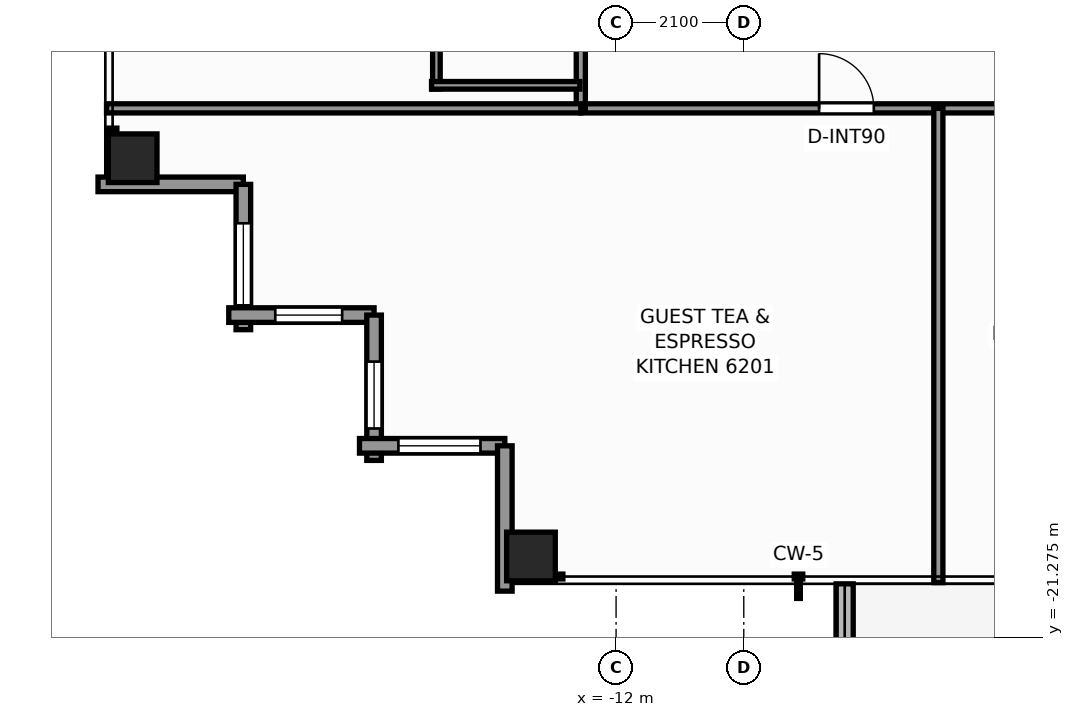
"""IFC4 building model, lengths in metres.
Left out: names, types, materials, properties, quantities, classifications, styles, units other than length and angle.
Written with IfcOpenShell. Run it as: python <this file> out.ifc"""

import sys

from ifc_helpers import new_model, si_unit, direction, frame, frame_2d, origin, origin_2d, place, context, subcontext, project, spatial, rectangle, extrude, element, fill, save


model = new_model("IFC4")
c1 = context("Model", 3, precision=1e-05, world=origin(), true_north=direction((0.0, 1.0)))
c2 = subcontext(c1, "Body", "Model", "MODEL_VIEW")
j1 = project(units=[si_unit("LENGTHUNIT", "METRE"), si_unit("PLANEANGLEUNIT", "RADIAN")], contexts=[c1])
p1 = place(None, origin())
s1 = spatial("IfcSite", under=j1, at=p1, CompositionType="ELEMENT")
p2 = place(p1, origin())
s2 = spatial("IfcBuilding", under=s1, at=p2, CompositionType="ELEMENT")
p3 = place(p2, frame((0.0, 0.0, 213.0)))
s3 = spatial("IfcBuildingStorey", under=s2, at=p3, CompositionType="ELEMENT", Elevation=213.0)
for number, where, z_axis, x_axis in (
    (1, (-13.4, -19.95, 0.0), (0.0, 0.0, 1.0), (1.0, 0.0, 0.0)),
    (2, (-19.95, -13.4, 0.0), (0.0, 0.0, 1.0), (1.0, 0.0, 0.0)),
):
    element("IfcColumn", number, at=place(p3, frame(where, z_axis=z_axis, x_axis=x_axis)), inside=s3, PredefinedType="COLUMN", context=c2, shape_type="SweptSolid", body=[
        extrude(rectangle(XDim=0.8, YDim=0.8, at=origin_2d()), origin(), (0.0, 0.0, 1.0), 3.3),
    ])
p4 = place(p3, frame((-8.24, -20.4, -0.04), z_axis=(0.0, 0.0, 1.0), x_axis=(0.0, -1.0, 0.0)))
e3 = element("IfcWall", 3, at=p4, inside=s3, PredefinedType="PARAPET", context=c2, shape_type="SweptSolid", body=[
    extrude(rectangle(XDim=1.466, YDim=0.28, at=frame_2d((0.733, 0.0))), origin(), (0.0, 0.0, 1.0), 0.42),
])
p5 = place(p3, frame((-18.13, -13.83, 0.0), z_axis=(0.0, 0.0, 1.0), x_axis=(-1.0, 0.0, 0.0)))
e4 = element("IfcWall", 4, at=p5, inside=s3, PredefinedType="STANDARD", context=c2, shape_type="SweptSolid", body=[
    extrude(rectangle(XDim=2.39, YDim=0.24, at=frame_2d((1.195, 0.0))), origin(), (0.0, 0.0, 1.0), 2.463),
])
p6 = place(p3, frame((-18.13, -16.22, 0.0), z_axis=(0.0, 0.0, 1.0), x_axis=(0.0, 1.0, 0.0)))
e5 = element("IfcWall", 5, at=p6, inside=s3, PredefinedType="STANDARD", context=c2, shape_type="SweptSolid", body=[
    extrude(rectangle(XDim=2.39, YDim=0.24, at=frame_2d((1.195, 0.0))), origin(), (0.0, 0.0, 1.0), 2.463),
])
p7 = place(p6, frame((0.4, 0.0, 0.65)))
e6 = element("IfcOpeningElement", 6, at=p7, cuts=e5, PredefinedType="OPENING", context=c2, shape_type="SweptSolid", body=[
    extrude(rectangle(XDim=1.35, YDim=1.55, at=frame_2d((0.675, 0.775))), frame((0.0, 0.13, 0.0), z_axis=(0.0, -1.0, 0.0), x_axis=(1.0, 0.0, 0.0)), (0.0, 0.0, 1.0), 0.26),
])
p8 = place(p3, frame((-15.98, -15.98, 0.0), z_axis=(0.0, 0.0, 1.0), x_axis=(-1.0, 0.0, 0.0)))
e7 = element("IfcWall", 7, at=p8, inside=s3, PredefinedType="STANDARD", context=c2, shape_type="SweptSolid", body=[
    extrude(rectangle(XDim=2.39, YDim=0.24, at=frame_2d((1.195, 0.0))), origin(), (0.0, 0.0, 1.0), 2.463),
])
p9 = place(p8, frame((0.525, 0.0, 0.65)))
e8 = element("IfcOpeningElement", 8, at=p9, cuts=e7, PredefinedType="OPENING", context=c2, shape_type="SweptSolid", body=[
    extrude(rectangle(XDim=1.1, YDim=1.45, at=frame_2d((0.55, 0.725))), frame((0.0, 0.13, 0.0), z_axis=(0.0, -1.0, 0.0), x_axis=(1.0, 0.0, 0.0)), (0.0, 0.0, 1.0), 0.26),
])
p10 = place(p3, frame((-15.98, -18.37, 0.0), z_axis=(0.0, 0.0, 1.0), x_axis=(0.0, 1.0, 0.0)))
e9 = element("IfcWall", 9, at=p10, inside=s3, PredefinedType="STANDARD", context=c2, shape_type="SweptSolid", body=[
    extrude(rectangle(XDim=2.39, YDim=0.24, at=frame_2d((1.195, 0.0))), origin(), (0.0, 0.0, 1.0), 2.463),
])
p11 = place(p10, frame((0.525, 0.0, 0.65)))
e10 = element("IfcOpeningElement", 10, at=p11, cuts=e9, PredefinedType="OPENING", context=c2, shape_type="SweptSolid", body=[
    extrude(rectangle(XDim=1.1, YDim=1.45, at=frame_2d((0.55, 0.725))), frame((0.0, 0.13, 0.0), z_axis=(0.0, -1.0, 0.0), x_axis=(1.0, 0.0, 0.0)), (0.0, 0.0, 1.0), 0.26),
])
p12 = place(p3, frame((-13.83, -18.13, 0.0), z_axis=(0.0, 0.0, 1.0), x_axis=(-1.0, 0.0, 0.0)))
e11 = element("IfcWall", 11, at=p12, inside=s3, PredefinedType="STANDARD", context=c2, shape_type="SweptSolid", body=[
    extrude(rectangle(XDim=2.39, YDim=0.24, at=frame_2d((1.195, 0.0))), origin(), (0.0, 0.0, 1.0), 2.463),
])
p13 = place(p12, frame((0.4, 0.0, 0.65)))
e12 = element("IfcOpeningElement", 12, at=p13, cuts=e11, PredefinedType="OPENING", context=c2, shape_type="SweptSolid", body=[
    extrude(rectangle(XDim=1.35, YDim=1.55, at=frame_2d((0.675, 0.775))), frame((0.0, 0.13, 0.0), z_axis=(0.0, -1.0, 0.0), x_axis=(1.0, 0.0, 0.0)), (0.0, 0.0, 1.0), 0.26),
])
p14 = place(p3, frame((-13.83, -20.52, 0.0), z_axis=(0.0, 0.0, 1.0), x_axis=(0.0, 1.0, 0.0)))
e13 = element("IfcWall", 13, at=p14, inside=s3, PredefinedType="STANDARD", context=c2, shape_type="SweptSolid", body=[
    extrude(rectangle(XDim=2.39, YDim=0.24, at=frame_2d((1.195, 0.0))), origin(), (0.0, 0.0, 1.0), 2.463),
])
p15 = place(p3, frame((-12.58, -12.58, 0.0), z_axis=(0.0, 0.0, 1.0), x_axis=(1.0, 0.0, 0.0)))
e14 = element("IfcWall", 14, at=p15, inside=s3, PredefinedType="PARTITIONING", context=c2, shape_type="SweptSolid", body=[
    extrude(rectangle(XDim=25.16, YDim=0.15, at=frame_2d((12.58, 0.0))), origin(), (0.0, 0.0, 1.0), 2.369),
])
p16 = place(p15, frame((3.919, 0.0, 0.0)))
e15 = element("IfcOpeningElement", 15, at=p16, cuts=e14, PredefinedType="OPENING", context=c2, shape_type="SweptSolid", body=[
    extrude(rectangle(XDim=0.9, YDim=2.06, at=frame_2d((0.45, 1.03))), frame((0.0, 0.085, 0.0), z_axis=(0.0, -1.0, 0.0), x_axis=(1.0, 0.0, 0.0)), (0.0, 0.0, 1.0), 0.17),
])
p17 = place(p15, frame((8.951, 0.0, 0.0)))
e16 = element("IfcOpeningElement", 16, at=p17, cuts=e14, PredefinedType="OPENING", context=c2, shape_type="SweptSolid", body=[
    extrude(rectangle(XDim=0.9, YDim=2.06, at=frame_2d((0.45, 1.03))), frame((0.0, 0.085, 0.0), z_axis=(0.0, -1.0, 0.0), x_axis=(1.0, 0.0, 0.0)), (0.0, 0.0, 1.0), 0.17),
])
p18 = place(p15, frame((10.78, 0.0, 0.0)))
e17 = element("IfcOpeningElement", 17, at=p18, cuts=e14, PredefinedType="OPENING", context=c2, shape_type="SweptSolid", body=[
    extrude(rectangle(XDim=0.9, YDim=2.06, at=frame_2d((0.45, 1.03))), frame((0.0, 0.085, 0.0), z_axis=(0.0, -1.0, 0.0), x_axis=(1.0, 0.0, 0.0)), (0.0, 0.0, 1.0), 0.17),
])
p19 = place(p15, frame((13.749, 0.0, 0.0)))
e18 = element("IfcOpeningElement", 18, at=p19, cuts=e14, PredefinedType="OPENING", context=c2, shape_type="SweptSolid", body=[
    extrude(rectangle(XDim=0.95, YDim=2.06, at=frame_2d((0.475, 1.03))), frame((0.0, 0.085, 0.0), z_axis=(0.0, -1.0, 0.0), x_axis=(1.0, 0.0, 0.0)), (0.0, 0.0, 1.0), 0.17),
])
p20 = place(p15, frame((18.268, 0.0, 0.0)))
e19 = element("IfcOpeningElement", 19, at=p20, cuts=e14, PredefinedType="OPENING", context=c2, shape_type="SweptSolid", body=[
    extrude(rectangle(XDim=0.9, YDim=2.06, at=frame_2d((0.45, 1.03))), frame((0.0, 0.085, 0.0), z_axis=(0.0, -1.0, 0.0), x_axis=(1.0, 0.0, 0.0)), (0.0, 0.0, 1.0), 0.17),
])
p21 = place(p15, frame((20.283, 0.0, 0.0)))
e20 = element("IfcOpeningElement", 20, at=p21, cuts=e14, PredefinedType="OPENING", context=c2, shape_type="SweptSolid", body=[
    extrude(rectangle(XDim=0.95, YDim=2.06, at=frame_2d((0.475, 1.03))), frame((0.0, 0.085, 0.0), z_axis=(0.0, -1.0, 0.0), x_axis=(1.0, 0.0, 0.0)), (0.0, 0.0, 1.0), 0.17),
])
p22 = place(p3, frame((-12.58, -12.58, 0.0), z_axis=(0.0, 0.0, 1.0), x_axis=(0.0, 1.0, 0.0)))
e21 = element("IfcWall", 21, at=p22, inside=s3, PredefinedType="PARTITIONING", context=c2, shape_type="SweptSolid", body=[
    extrude(rectangle(XDim=24.84, YDim=0.15, at=frame_2d((12.42, 0.0))), origin(), (0.0, 0.0, 1.0), 2.369),
])
p23 = place(p22, frame((3.856, 0.0, 0.0)))
e22 = element("IfcOpeningElement", 22, at=p23, cuts=e21, PredefinedType="OPENING", context=c2, shape_type="SweptSolid", body=[
    extrude(rectangle(XDim=0.95, YDim=2.06, at=frame_2d((0.475, 1.03))), frame((0.0, 0.085, 0.0), z_axis=(0.0, -1.0, 0.0), x_axis=(1.0, 0.0, 0.0)), (0.0, 0.0, 1.0), 0.17),
])
p24 = place(p22, frame((9.958, 0.0, 0.0)))
e23 = element("IfcOpeningElement", 23, at=p24, cuts=e21, PredefinedType="OPENING", context=c2, shape_type="SweptSolid", body=[
    extrude(rectangle(XDim=0.95, YDim=2.06, at=frame_2d((0.475, 1.03))), frame((0.0, 0.085, 0.0), z_axis=(0.0, -1.0, 0.0), x_axis=(1.0, 0.0, 0.0)), (0.0, 0.0, 1.0), 0.17),
])
p25 = place(p22, frame((19.64, 0.0, 0.0)))
e24 = element("IfcOpeningElement", 24, at=p25, cuts=e21, PredefinedType="OPENING", context=c2, shape_type="SweptSolid", body=[
    extrude(rectangle(XDim=0.95, YDim=2.06, at=frame_2d((0.475, 1.03))), frame((0.0, 0.085, 0.0), z_axis=(0.0, -1.0, 0.0), x_axis=(1.0, 0.0, 0.0)), (0.0, 0.0, 1.0), 0.17),
])
p26 = place(p3, frame((-20.38, -12.58, 0.0), z_axis=(0.0, 0.0, 1.0), x_axis=(1.0, 0.0, 0.0)))
e25 = element("IfcWall", 25, at=p26, inside=s3, PredefinedType="PARTITIONING", context=c2, shape_type="SweptSolid", body=[
    extrude(rectangle(XDim=7.8, YDim=0.15, at=frame_2d((3.9, 0.0))), origin(), (0.0, 0.0, 1.0), 2.369),
])
p27 = place(p3, frame((-6.7, -20.38, 0.0), z_axis=(0.0, 0.0, 1.0), x_axis=(0.0, 1.0, 0.0)))
e26 = element("IfcWall", 26, at=p27, inside=s3, PredefinedType="PARTITIONING", context=c2, shape_type="SweptSolid", body=[
    extrude(rectangle(XDim=7.8, YDim=0.15, at=frame_2d((3.9, 0.0))), origin(), (0.0, 0.0, 1.0), 2.453),
])
p28 = place(p3, frame((-14.955, -12.261, 0.0), z_axis=(0.0, 0.0, 1.0), x_axis=(0.0, 1.0, 0.0)))
e27 = element("IfcWall", 27, at=p28, inside=s3, PredefinedType="PARTITIONING", context=c2, shape_type="SweptSolid", body=[
    extrude(rectangle(XDim=2.27, YDim=0.125, at=frame_2d((1.135, 0.0))), origin(), (0.0, 0.0, 1.0), 2.369),
])
p29 = place(p3, frame((-15.035, -12.201, 0.0), z_axis=(0.0, 0.0, 1.0), x_axis=(1.0, 0.0, 0.0)))
e28 = element("IfcWall", 28, at=p29, inside=s3, PredefinedType="PARTITIONING", context=c2, shape_type="SweptSolid", body=[
    extrude(rectangle(XDim=2.44, YDim=0.125, at=frame_2d((1.22, 0.0))), origin(), (0.0, 0.0, 1.0), 3.08),
])
p30 = place(p7, origin())
e29 = element("IfcWindow", 29, at=p30, inside=s3, PartitioningType="SINGLE_PANEL", PredefinedType="WINDOW", context=c2, shape_type="SweptSolid", body=[
    extrude(rectangle(XDim=1.35, YDim=1.55, at=frame_2d((0.675, 0.775))), frame((0.0, 0.03, 0.0), z_axis=(0.0, -1.0, 0.0), x_axis=(1.0, 0.0, 0.0)), (0.0, 0.0, 1.0), 0.06),
])
fill(e6, e29)
p31 = place(p9, origin())
e30 = element("IfcWindow", 30, at=p31, inside=s3, PartitioningType="SINGLE_PANEL", PredefinedType="WINDOW", context=c2, shape_type="SweptSolid", body=[
    extrude(rectangle(XDim=1.1, YDim=1.45, at=frame_2d((0.55, 0.725))), frame((0.0, 0.03, 0.0), z_axis=(0.0, -1.0, 0.0), x_axis=(1.0, 0.0, 0.0)), (0.0, 0.0, 1.0), 0.06),
])
fill(e8, e30)
p32 = place(p11, origin())
e31 = element("IfcWindow", 31, at=p32, inside=s3, PartitioningType="SINGLE_PANEL", PredefinedType="WINDOW", context=c2, shape_type="SweptSolid", body=[
    extrude(rectangle(XDim=1.1, YDim=1.45, at=frame_2d((0.55, 0.725))), frame((0.0, 0.03, 0.0), z_axis=(0.0, -1.0, 0.0), x_axis=(1.0, 0.0, 0.0)), (0.0, 0.0, 1.0), 0.06),
])
fill(e10, e31)
p33 = place(p13, origin())
e32 = element("IfcWindow", 32, at=p33, inside=s3, PartitioningType="SINGLE_PANEL", PredefinedType="WINDOW", context=c2, shape_type="SweptSolid", body=[
    extrude(rectangle(XDim=1.35, YDim=1.55, at=frame_2d((0.675, 0.775))), frame((0.0, 0.03, 0.0), z_axis=(0.0, -1.0, 0.0), x_axis=(1.0, 0.0, 0.0)), (0.0, 0.0, 1.0), 0.06),
])
fill(e12, e32)
p34 = place(p16, origin())
e33 = element("IfcDoor", 33, at=p34, inside=s3, OperationType="SINGLE_SWING_LEFT", PredefinedType="DOOR", context=c2, shape_type="SweptSolid", body=[
    extrude(rectangle(XDim=0.9, YDim=2.06, at=frame_2d((0.45, 1.03))), frame((0.0, 0.025, 0.0), z_axis=(0.0, -1.0, 0.0), x_axis=(1.0, 0.0, 0.0)), (0.0, 0.0, 1.0), 0.05),
])
fill(e15, e33)
save(model, sys.argv[1])
